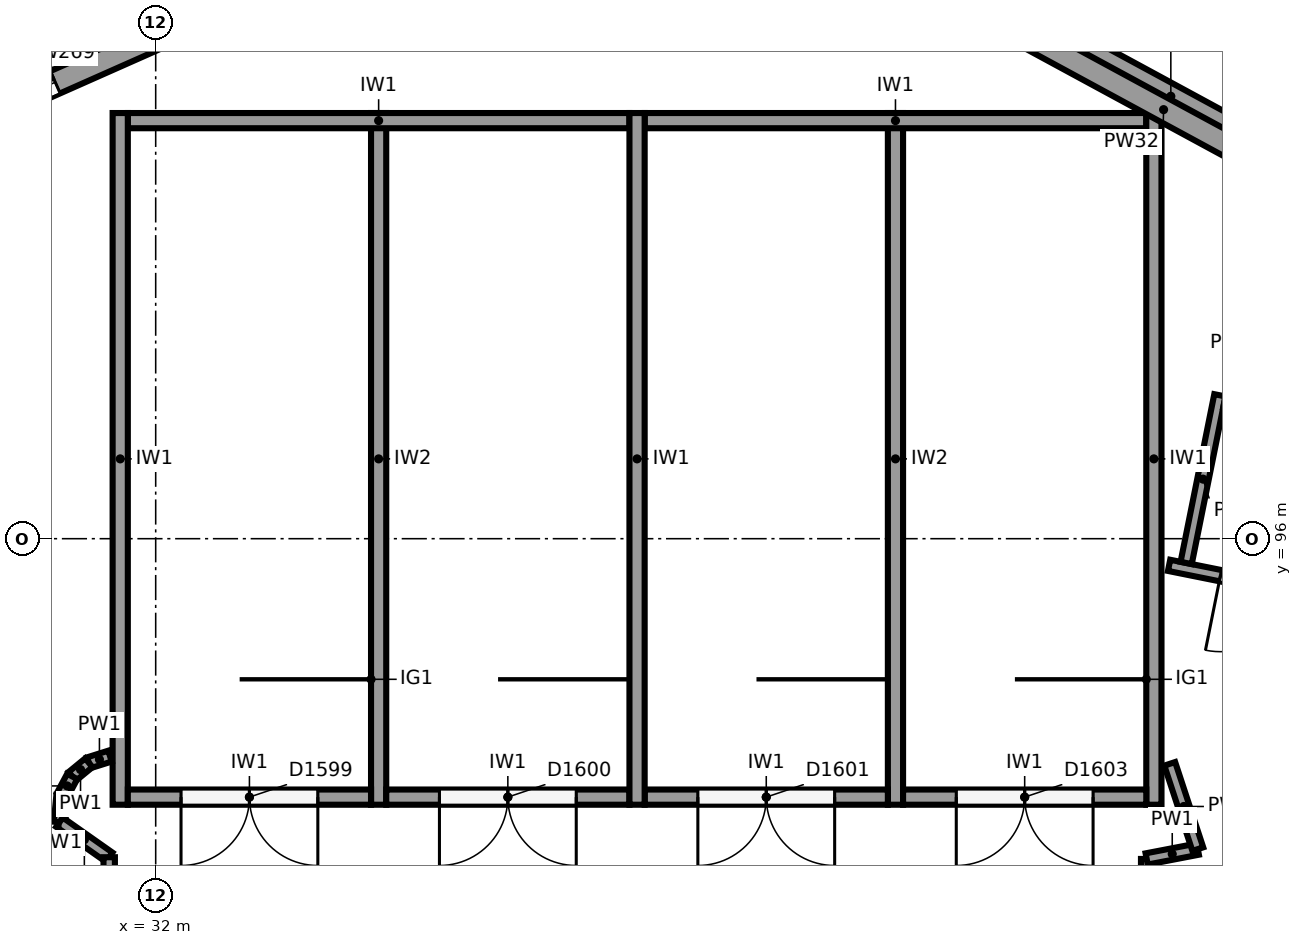
"""IFC4 building model, lengths in metres.
Left out: names, types, materials, properties, quantities, classifications, styles, units other than length and angle.
Written with IfcOpenShell. Run it as: python <this file> out.ifc"""

import sys

from ifc_helpers import new_model, si_unit, direction, frame, frame_2d, origin, place, context, subcontext, project, spatial, polyline, rectangle, outline, extrude, element, fill, save


model = new_model("IFC4")
c1 = context("Model", 3, precision=1e-05, world=origin(), true_north=direction((0.0, 1.0)))
c2 = subcontext(c1, "Body", "Model", "MODEL_VIEW")
j1 = project(units=[si_unit("LENGTHUNIT", "METRE"), si_unit("PLANEANGLEUNIT", "RADIAN")], contexts=[c1])
p1 = place(None, origin())
s1 = spatial("IfcSite", under=j1, at=p1, CompositionType="ELEMENT")
p2 = place(p1, origin())
s2 = spatial("IfcBuilding", under=s1, at=p2, CompositionType="ELEMENT")
p3 = place(p2, frame((0.0, 0.0, 24.0)))
s3 = spatial("IfcBuildingStorey", under=s2, at=p3, CompositionType="ELEMENT", Elevation=24.0)
p4 = place(p3, frame((39.476, 104.781, 0.0), z_axis=(0.0, 0.0, 1.0), x_axis=(0.87914528567, -0.476553844476, 0.0)))
e1 = element("IfcWall", 1, at=p4, inside=s3, PredefinedType="SOLIDWALL", context=c2, shape_type="SweptSolid", body=[
    extrude(rectangle(XDim=13.161, YDim=0.32, at=frame_2d((6.58, 0.0))), origin(), (0.0, 0.0, 1.0), 6.0),
])
p5 = place(p3, frame((39.571, 104.957, 6.0), z_axis=(0.0, 0.0, 1.0), x_axis=(0.879137513539, -0.476568182204, 0.0)))
e2 = element("IfcWall", 2, at=p5, inside=s3, PredefinedType="SOLIDWALL", context=c2, shape_type="SweptSolid", body=[
    extrude(outline(polyline([(0.0, 0.0), (13.161, 0.0), (13.161, 4.095), (0.0, 10.097), (0.0, 0.0)])), frame((0.0, 0.16, 0.0), z_axis=(0.0, -1.0, 0.0), x_axis=(1.0, 0.0, 0.0)), (0.0, 0.0, 1.0), 0.32),
])
p6 = place(p3, frame((23.411, 98.782, 0.0), z_axis=(0.0, 0.0, 1.0), x_axis=(0.914136899386, 0.405405635359, 0.0)))
e3 = element("IfcWall", 3, at=p6, inside=s3, PredefinedType="SOLIDWALL", context=c2, shape_type="SweptSolid", body=[
    extrude(rectangle(XDim=15.025, YDim=0.32, at=frame_2d((7.513, 0.0))), origin(), (0.0, 0.0, 1.0), 6.0),
])
p7 = place(p6, frame((0.75, 0.0, 1.0)))
e4 = element("IfcOpeningElement", 4, at=p7, cuts=e3, PredefinedType="OPENING", context=c2, shape_type="SweptSolid", body=[
    extrude(rectangle(XDim=0.9, YDim=3.25, at=frame_2d((0.45, 1.625))), frame((0.0, 0.17, 0.0), z_axis=(0.0, -1.0, 0.0), x_axis=(1.0, 0.0, 0.0)), (0.0, 0.0, 1.0), 0.34),
])
p8 = place(p6, frame((2.85, 0.0, 1.0)))
e5 = element("IfcOpeningElement", 5, at=p8, cuts=e3, PredefinedType="OPENING", context=c2, shape_type="SweptSolid", body=[
    extrude(rectangle(XDim=0.9, YDim=3.25, at=frame_2d((0.45, 1.625))), frame((0.0, 0.17, 0.0), z_axis=(0.0, -1.0, 0.0), x_axis=(1.0, 0.0, 0.0)), (0.0, 0.0, 1.0), 0.34),
])
p9 = place(p6, frame((4.95, 0.0, 1.0)))
e6 = element("IfcOpeningElement", 6, at=p9, cuts=e3, PredefinedType="OPENING", context=c2, shape_type="SweptSolid", body=[
    extrude(rectangle(XDim=0.9, YDim=3.25, at=frame_2d((0.45, 1.625))), frame((0.0, 0.17, 0.0), z_axis=(0.0, -1.0, 0.0), x_axis=(1.0, 0.0, 0.0)), (0.0, 0.0, 1.0), 0.34),
])
p10 = place(p6, frame((7.05, 0.0, 1.0)))
e7 = element("IfcOpeningElement", 7, at=p10, cuts=e3, PredefinedType="OPENING", context=c2, shape_type="SweptSolid", body=[
    extrude(rectangle(XDim=0.9, YDim=3.25, at=frame_2d((0.45, 1.625))), frame((0.0, 0.17, 0.0), z_axis=(0.0, -1.0, 0.0), x_axis=(1.0, 0.0, 0.0)), (0.0, 0.0, 1.0), 0.34),
])
p11 = place(p3, frame((23.33, 98.965, 6.0), z_axis=(0.0, 0.0, 1.0), x_axis=(0.914136899386, 0.405405635359, 0.0)))
e8 = element("IfcWall", 8, at=p11, inside=s3, PredefinedType="SOLIDWALL", context=c2, shape_type="SweptSolid", body=[
    extrude(outline(polyline([(0.0, 0.0), (15.025, 0.0), (15.025, 10.164), (0.0, 4.072), (0.0, 0.0)])), frame((0.0, 0.16, 0.0), z_axis=(0.0, -1.0, 0.0), x_axis=(1.0, 0.0, 0.0)), (0.0, 0.0, 1.0), 0.32),
])
p12 = place(p11, frame((4.95, 0.0, 1.6)))
e9 = element("IfcOpeningElement", 9, at=p12, cuts=e8, PredefinedType="OPENING", context=c2, shape_type="SweptSolid", body=[
    extrude(rectangle(XDim=0.9, YDim=3.0, at=frame_2d((0.45, 1.5))), frame((0.0, 0.17, 0.0), z_axis=(0.0, -1.0, 0.0), x_axis=(1.0, 0.0, 0.0)), (0.0, 0.0, 1.0), 0.34),
])
p13 = place(p11, frame((7.05, 0.0, 1.6)))
e10 = element("IfcOpeningElement", 10, at=p13, cuts=e8, PredefinedType="OPENING", context=c2, shape_type="SweptSolid", body=[
    extrude(rectangle(XDim=0.9, YDim=3.0, at=frame_2d((0.45, 1.5))), frame((0.0, 0.17, 0.0), z_axis=(0.0, -1.0, 0.0), x_axis=(1.0, 0.0, 0.0)), (0.0, 0.0, 1.0), 0.34),
])
for number, where, z_axis, x_axis in (
    (11, (45.133, 101.6, 0.0), (0.0, 0.0, 1.0), (0.0, -1.0, 0.0)),
    (12, (38.333, 101.6, 0.0), (0.0, 0.0, 1.0), (0.0, -1.0, 0.0)),
    (13, (31.533, 101.6, 0.0), (0.0, 0.0, 1.0), (0.0, -1.0, 0.0)),
):
    element("IfcWall", number, at=place(p3, frame(where, z_axis=z_axis, x_axis=x_axis)), inside=s3, PredefinedType="SHEAR", context=c2, shape_type="SweptSolid", body=[
        extrude(rectangle(XDim=9.1, YDim=0.2, at=frame_2d((4.55, 0.0))), origin(), (0.0, 0.0, 1.0), 5.75),
    ])
p14 = place(p3, frame((45.033, 101.5, 0.0), z_axis=(0.0, 0.0, 1.0), x_axis=(-1.0, 0.0, 0.0)))
e14 = element("IfcWall", 14, at=p14, inside=s3, PredefinedType="SHEAR", context=c2, shape_type="SweptSolid", body=[
    extrude(rectangle(XDim=6.6, YDim=0.2, at=frame_2d((3.3, 0.0))), origin(), (0.0, 0.0, 1.0), 5.75),
])
p15 = place(p3, frame((38.233, 101.5, 0.0), z_axis=(0.0, 0.0, 1.0), x_axis=(-1.0, 0.0, 0.0)))
e15 = element("IfcWall", 15, at=p15, inside=s3, PredefinedType="SHEAR", context=c2, shape_type="SweptSolid", body=[
    extrude(rectangle(XDim=6.6, YDim=0.2, at=frame_2d((3.3, 0.0))), origin(), (0.0, 0.0, 1.0), 5.75),
])
for number, where, z_axis, x_axis in (
    (16, (41.733, 101.6, 0.0), (0.0, 0.0, 1.0), (0.0, -1.0, 0.0)),
    (17, (34.933, 101.6, 0.0), (0.0, 0.0, 1.0), (0.0, -1.0, 0.0)),
):
    element("IfcWall", number, at=place(p3, frame(where, z_axis=z_axis, x_axis=x_axis)), inside=s3, PredefinedType="SHEAR", context=c2, shape_type="SweptSolid", body=[
        extrude(rectangle(XDim=9.1, YDim=0.2, at=frame_2d((4.55, 0.0))), origin(), (0.0, 0.0, 1.0), 5.75),
    ])
p16 = place(p3, frame((45.033, 92.6, 0.0), z_axis=(0.0, 0.0, 1.0), x_axis=(-1.0, 0.0, 0.0)))
e18 = element("IfcWall", 18, at=p16, inside=s3, PredefinedType="SHEAR", context=c2, shape_type="SweptSolid", body=[
    extrude(rectangle(XDim=3.2, YDim=0.2, at=frame_2d((1.6, 0.0))), origin(), (0.0, 0.0, 1.0), 5.75),
])
p17 = place(p16, frame((0.7, 0.0, 0.0)))
e19 = element("IfcOpeningElement", 19, at=p17, cuts=e18, PredefinedType="OPENING", context=c2, shape_type="SweptSolid", body=[
    extrude(rectangle(XDim=1.8, YDim=2.1, at=frame_2d((0.9, 1.05))), frame((0.0, 0.11, 0.0), z_axis=(0.0, -1.0, 0.0), x_axis=(1.0, 0.0, 0.0)), (0.0, 0.0, 1.0), 0.22),
])
p18 = place(p3, frame((41.633, 92.6, 0.0), z_axis=(0.0, 0.0, 1.0), x_axis=(-1.0, 0.0, 0.0)))
e20 = element("IfcWall", 20, at=p18, inside=s3, PredefinedType="SHEAR", context=c2, shape_type="SweptSolid", body=[
    extrude(rectangle(XDim=3.2, YDim=0.2, at=frame_2d((1.6, 0.0))), origin(), (0.0, 0.0, 1.0), 5.75),
])
p19 = place(p18, frame((0.7, 0.0, 0.0)))
e21 = element("IfcOpeningElement", 21, at=p19, cuts=e20, PredefinedType="OPENING", context=c2, shape_type="SweptSolid", body=[
    extrude(rectangle(XDim=1.8, YDim=2.1, at=frame_2d((0.9, 1.05))), frame((0.0, 0.11, 0.0), z_axis=(0.0, -1.0, 0.0), x_axis=(1.0, 0.0, 0.0)), (0.0, 0.0, 1.0), 0.22),
])
p20 = place(p3, frame((38.233, 92.6, 0.0), z_axis=(0.0, 0.0, 1.0), x_axis=(-1.0, 0.0, 0.0)))
e22 = element("IfcWall", 22, at=p20, inside=s3, PredefinedType="SHEAR", context=c2, shape_type="SweptSolid", body=[
    extrude(rectangle(XDim=3.2, YDim=0.2, at=frame_2d((1.6, 0.0))), origin(), (0.0, 0.0, 1.0), 5.75),
])
p21 = place(p20, frame((0.7, 0.0, 0.0)))
e23 = element("IfcOpeningElement", 23, at=p21, cuts=e22, PredefinedType="OPENING", context=c2, shape_type="SweptSolid", body=[
    extrude(rectangle(XDim=1.8, YDim=2.1, at=frame_2d((0.9, 1.05))), frame((0.0, 0.11, 0.0), z_axis=(0.0, -1.0, 0.0), x_axis=(1.0, 0.0, 0.0)), (0.0, 0.0, 1.0), 0.22),
])
p22 = place(p3, frame((34.833, 92.6, 0.0), z_axis=(0.0, 0.0, 1.0), x_axis=(-1.0, 0.0, 0.0)))
e24 = element("IfcWall", 24, at=p22, inside=s3, PredefinedType="SHEAR", context=c2, shape_type="SweptSolid", body=[
    extrude(rectangle(XDim=3.2, YDim=0.2, at=frame_2d((1.6, 0.0))), origin(), (0.0, 0.0, 1.0), 5.75),
])
p23 = place(p22, frame((0.7, 0.0, 0.0)))
e25 = element("IfcOpeningElement", 25, at=p23, cuts=e24, PredefinedType="OPENING", context=c2, shape_type="SweptSolid", body=[
    extrude(rectangle(XDim=1.8, YDim=2.1, at=frame_2d((0.9, 1.05))), frame((0.0, 0.11, 0.0), z_axis=(0.0, -1.0, 0.0), x_axis=(1.0, 0.0, 0.0)), (0.0, 0.0, 1.0), 0.22),
])
p24 = place(p3, frame((47.676, 95.178, 0.0), z_axis=(0.0, 0.0, 1.0), x_axis=(-0.980379720277, 0.197118248949, 0.0)))
e26 = element("IfcWall", 26, at=p24, inside=s3, PredefinedType="PARTITIONING", context=c2, shape_type="SweptSolid", body=[
    extrude(rectangle(XDim=2.389, YDim=0.15, at=frame_2d((1.195, 0.0))), origin(), (0.0, 0.0, 1.0), 5.4),
])
p25 = place(p24, frame((0.7, 0.0, 0.0)))
e27 = element("IfcOpeningElement", 27, at=p25, cuts=e26, PredefinedType="OPENING", context=c2, shape_type="SweptSolid", body=[
    extrude(rectangle(XDim=1.0, YDim=2.1, at=frame_2d((0.5, 1.05))), frame((0.0, 0.085, 0.0), z_axis=(0.0, -1.0, 0.0), x_axis=(1.0, 0.0, 0.0)), (0.0, 0.0, 1.0), 0.17),
])
p26 = place(p3, frame((31.399, 93.139, 0.0), z_axis=(0.0, 0.0, 1.0), x_axis=(-0.954062086302, -0.299608970962, 0.0)))
e28 = element("IfcWall", 28, at=p26, inside=s3, PredefinedType="PARTITIONING", context=c2, shape_type="SweptSolid", body=[
    extrude(rectangle(XDim=0.292, YDim=0.15, at=frame_2d((0.146, 0.0))), origin(), (0.0, 0.0, 1.0), 5.4),
])
p27 = place(p3, frame((31.121, 93.052, 0.0), z_axis=(0.0, 0.0, 1.0), x_axis=(-0.773073370483, -0.634316611678, 0.0)))
e29 = element("IfcWall", 29, at=p27, inside=s3, PredefinedType="PARTITIONING", context=c2, shape_type="SweptSolid", body=[
    extrude(rectangle(XDim=0.283, YDim=0.15, at=frame_2d((0.142, 0.0))), origin(), (0.0, 0.0, 1.0), 5.4),
])
p28 = place(p3, frame((30.902, 92.872, 0.0), z_axis=(0.0, 0.0, 1.0), x_axis=(-0.471169334347, -0.882042775817, 0.0)))
e30 = element("IfcWall", 30, at=p28, inside=s3, PredefinedType="PARTITIONING", context=c2, shape_type="SweptSolid", body=[
    extrude(rectangle(XDim=0.283, YDim=0.15, at=frame_2d((0.142, 0.0))), origin(), (0.0, 0.0, 1.0), 5.4),
])
p29 = place(p3, frame((30.768, 92.622, 0.0), z_axis=(0.0, 0.0, 1.0), x_axis=(-0.094321730408, -0.995541767669, 0.0)))
e31 = element("IfcWall", 31, at=p29, inside=s3, PredefinedType="PARTITIONING", context=c2, shape_type="SweptSolid", body=[
    extrude(rectangle(XDim=0.354, YDim=0.15, at=frame_2d((0.177, 0.0))), origin(), (0.0, 0.0, 1.0), 5.4),
])
p30 = place(p3, frame((30.735, 92.269, 0.0), z_axis=(0.0, 0.0, 1.0), x_axis=(0.817779793702, -0.575531240693, 0.0)))
e32 = element("IfcWall", 32, at=p30, inside=s3, PredefinedType="PARTITIONING", context=c2, shape_type="SweptSolid", body=[
    extrude(rectangle(XDim=0.799, YDim=0.15, at=frame_2d((0.399, 0.0))), origin(), (0.0, 0.0, 1.0), 5.4),
])
p31 = place(p3, frame((31.388, 91.809, 0.0), z_axis=(0.0, 0.0, 1.0), x_axis=(0.0, -1.0, 0.0)))
e33 = element("IfcWall", 33, at=p31, inside=s3, PredefinedType="PARTITIONING", context=c2, shape_type="SweptSolid", body=[
    extrude(rectangle(XDim=3.977, YDim=0.15, at=frame_2d((1.988, 0.0))), origin(), (0.0, 0.0, 1.0), 5.4),
])
p32 = place(p3, frame((45.038, 89.795, 0.0), z_axis=(0.0, 0.0, 1.0), x_axis=(0.0, 1.0, 0.0)))
e34 = element("IfcWall", 34, at=p32, inside=s3, PredefinedType="PARTITIONING", context=c2, shape_type="SweptSolid", body=[
    extrude(rectangle(XDim=1.991, YDim=0.15, at=frame_2d((0.996, 0.0))), origin(), (0.0, 0.0, 1.0), 5.4),
])
p33 = place(p3, frame((45.038, 91.787, 0.0), z_axis=(0.0, 0.0, 1.0), x_axis=(0.982006446981, 0.18884739365, 0.0)))
e35 = element("IfcWall", 35, at=p33, inside=s3, PredefinedType="PARTITIONING", context=c2, shape_type="SweptSolid", body=[
    extrude(rectangle(XDim=0.685, YDim=0.15, at=frame_2d((0.343, 0.0))), origin(), (0.0, 0.0, 1.0), 5.4),
])
p34 = place(p3, frame((45.711, 91.916, 0.0), z_axis=(0.0, 0.0, 1.0), x_axis=(-0.312505036406, 0.949916102727, 0.0)))
e36 = element("IfcWall", 36, at=p34, inside=s3, PredefinedType="PARTITIONING", context=c2, shape_type="SweptSolid", body=[
    extrude(rectangle(XDim=1.181, YDim=0.15, at=frame_2d((0.591, 0.0))), origin(), (0.0, 0.0, 1.0), 5.4),
])
p35 = place(p3, frame((45.558, 95.681, 0.0), z_axis=(0.0, 0.0, 1.0), x_axis=(0.197055078436, 0.980392419423, 0.0)))
e37 = element("IfcWall", 37, at=p35, inside=s3, PredefinedType="PARTITIONING", context=c2, shape_type="SweptSolid", body=[
    extrude(rectangle(XDim=2.25, YDim=0.15, at=frame_2d((1.125, 0.0))), origin(), (0.0, 0.0, 1.0), 5.4),
])
p36 = place(p10, origin())
e38 = element("IfcWindow", 38, at=p36, inside=s3, PartitioningType="SINGLE_PANEL", PredefinedType="WINDOW", context=c2, shape_type="SweptSolid", body=[
    extrude(rectangle(XDim=0.9, YDim=3.25, at=frame_2d((0.45, 1.625))), frame((0.0, 0.03, 0.0), z_axis=(0.0, -1.0, 0.0), x_axis=(1.0, 0.0, 0.0)), (0.0, 0.0, 1.0), 0.06),
])
fill(e7, e38)
p37 = place(p17, origin())
e39 = element("IfcDoor", 39, at=p37, inside=s3, OperationType="DOUBLE_DOOR_SINGLE_SWING", PredefinedType="DOOR", context=c2, shape_type="SweptSolid", body=[
    extrude(rectangle(XDim=1.8, YDim=2.1, at=frame_2d((0.9, 1.05))), frame((0.0, 0.025, 0.0), z_axis=(0.0, -1.0, 0.0), x_axis=(1.0, 0.0, 0.0)), (0.0, 0.0, 1.0), 0.05),
])
fill(e19, e39)
p38 = place(p19, origin())
e40 = element("IfcDoor", 40, at=p38, inside=s3, OperationType="DOUBLE_DOOR_SINGLE_SWING", PredefinedType="DOOR", context=c2, shape_type="SweptSolid", body=[
    extrude(rectangle(XDim=1.8, YDim=2.1, at=frame_2d((0.9, 1.05))), frame((0.0, 0.025, 0.0), z_axis=(0.0, -1.0, 0.0), x_axis=(1.0, 0.0, 0.0)), (0.0, 0.0, 1.0), 0.05),
])
fill(e21, e40)
p39 = place(p21, origin())
e41 = element("IfcDoor", 41, at=p39, inside=s3, OperationType="DOUBLE_DOOR_SINGLE_SWING", PredefinedType="DOOR", context=c2, shape_type="SweptSolid", body=[
    extrude(rectangle(XDim=1.8, YDim=2.1, at=frame_2d((0.9, 1.05))), frame((0.0, 0.025, 0.0), z_axis=(0.0, -1.0, 0.0), x_axis=(1.0, 0.0, 0.0)), (0.0, 0.0, 1.0), 0.05),
])
fill(e23, e41)
p40 = place(p23, origin())
e42 = element("IfcDoor", 42, at=p40, inside=s3, OperationType="DOUBLE_DOOR_SINGLE_SWING", PredefinedType="DOOR", context=c2, shape_type="SweptSolid", body=[
    extrude(rectangle(XDim=1.8, YDim=2.1, at=frame_2d((0.9, 1.05))), frame((0.0, 0.025, 0.0), z_axis=(0.0, -1.0, 0.0), x_axis=(1.0, 0.0, 0.0)), (0.0, 0.0, 1.0), 0.05),
])
fill(e25, e42)
p41 = place(p25, origin())
e43 = element("IfcDoor", 43, at=p41, inside=s3, OperationType="SINGLE_SWING_RIGHT", PredefinedType="DOOR", context=c2, shape_type="SweptSolid", body=[
    extrude(rectangle(XDim=1.0, YDim=2.1, at=frame_2d((0.5, 1.05))), frame((0.0, 0.025, 0.0), z_axis=(0.0, -1.0, 0.0), x_axis=(1.0, 0.0, 0.0)), (0.0, 0.0, 1.0), 0.05),
])
fill(e27, e43)
save(model, sys.argv[1])
